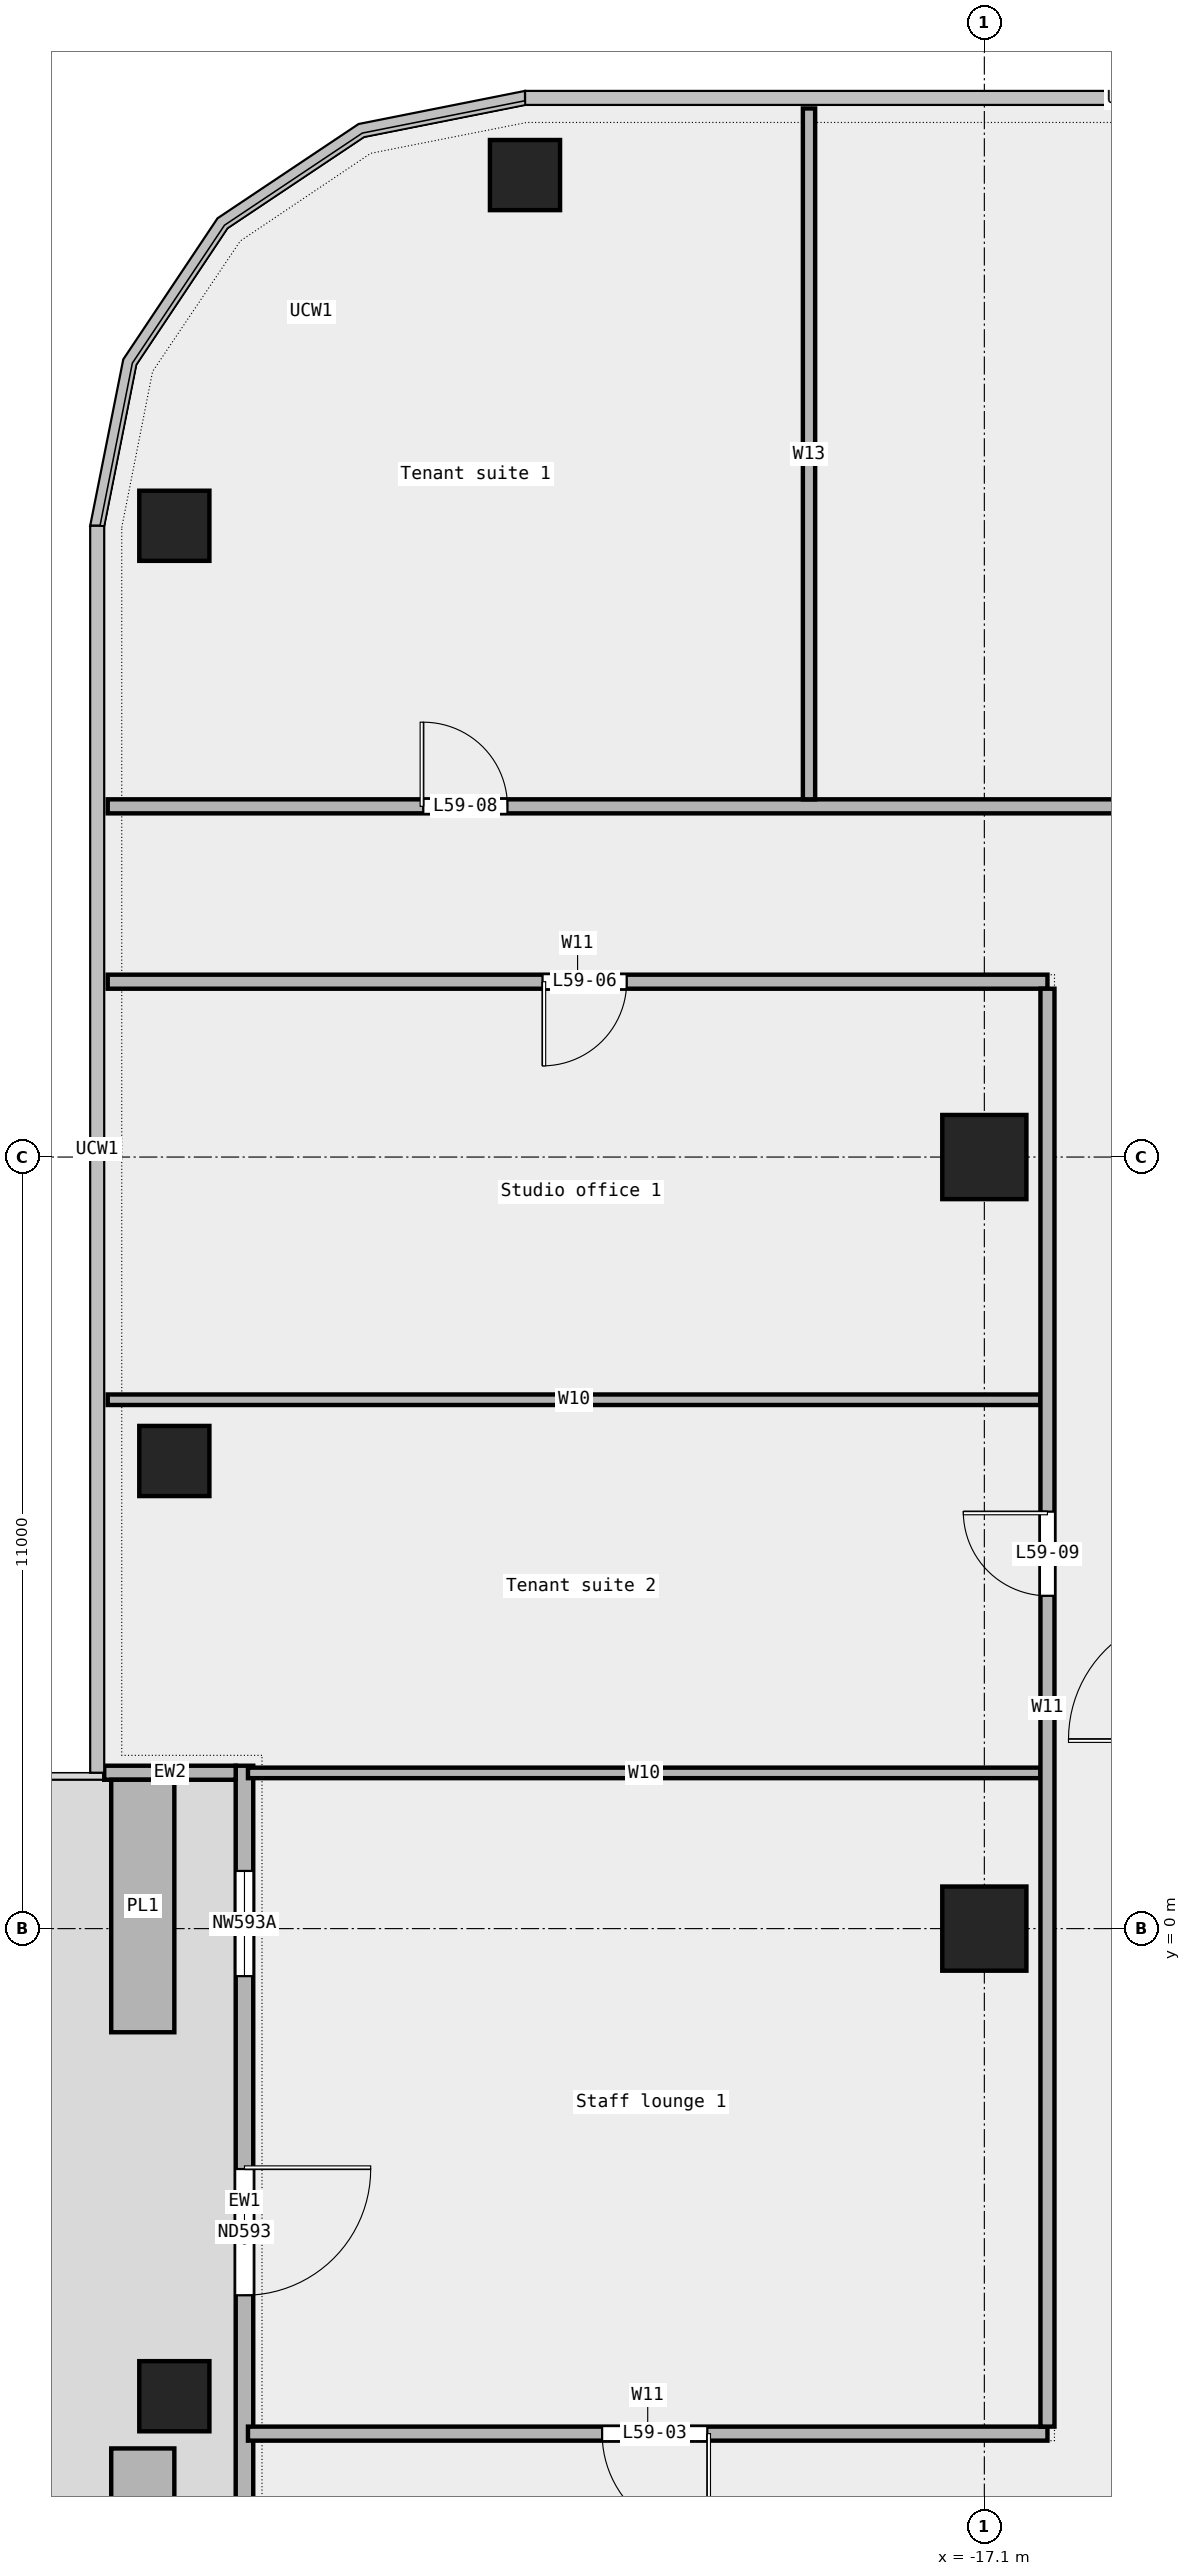
"""IFC4 building model, lengths in metres.
Left out: names, types, materials, properties, quantities, classifications, styles, units other than length and angle.
Written with IfcOpenShell. Run it as: python <this file> out.ifc"""

import sys

from ifc_helpers import new_model, si_unit, direction, frame, frame_2d, origin, origin_2d, place, context, subcontext, project, spatial, rectangle, extrude, element, fill, save


model = new_model("IFC4")
c1 = context("Model", 3, precision=1e-05, world=origin(), true_north=direction((0.0, 1.0)))
c2 = subcontext(c1, "Body", "Model", "MODEL_VIEW")
j1 = project(units=[si_unit("LENGTHUNIT", "METRE"), si_unit("PLANEANGLEUNIT", "RADIAN")], contexts=[c1])
p1 = place(None, origin())
s1 = spatial("IfcSite", under=j1, at=p1, CompositionType="ELEMENT")
p2 = place(p1, origin())
s2 = spatial("IfcBuilding", under=s1, at=p2, CompositionType="ELEMENT")
p3 = place(p2, frame((0.0, 0.0, 275.4)))
s3 = spatial("IfcBuildingStorey", under=s2, at=p3, CompositionType="ELEMENT", Elevation=275.4)
for number, where, z_axis, x_axis in (
    (1, (-23.65, 25.0, 0.0), (0.0, 0.0, 1.0), (1.0, 0.0, 0.0)),
    (2, (-28.65, 20.0, 0.0), (0.0, 0.0, 1.0), (1.0, 0.0, 0.0)),
    (3, (-28.65, 6.667, 0.0), (0.0, 0.0, 1.0), (1.0, 0.0, 0.0)),
    (4, (-28.65, -6.667, 0.0), (0.0, 0.0, 1.0), (1.0, 0.0, 0.0)),
):
    element("IfcColumn", number, at=place(p3, frame(where, z_axis=z_axis, x_axis=x_axis)), inside=s3, PredefinedType="COLUMN", context=c2, shape_type="SweptSolid", body=[
        extrude(rectangle(XDim=1.0, YDim=1.0, at=origin_2d()), origin(), (0.0, 0.0, 1.0), 3.6),
    ])
for number, where, z_axis, x_axis in (
    (5, (-17.1, 0.0, 0.0), (0.0, 0.0, 1.0), (1.0, 0.0, 0.0)),
    (6, (-17.1, 11.0, 0.0), (0.0, 0.0, 1.0), (1.0, 0.0, 0.0)),
):
    element("IfcColumn", number, at=place(p3, frame(where, z_axis=z_axis, x_axis=x_axis)), inside=s3, PredefinedType="COLUMN", context=c2, shape_type="SweptSolid", body=[
        extrude(rectangle(XDim=1.2, YDim=1.2, at=origin_2d()), origin(), (0.0, 0.0, 1.0), 3.6),
    ])
p4 = place(p3, frame((-27.65, 2.322, 0.0), z_axis=(0.0, 0.0, 1.0), x_axis=(0.0, -1.0, 0.0)))
e7 = element("IfcWall", 7, at=p4, inside=s3, PredefinedType="STANDARD", context=c2, shape_type="SweptSolid", body=[
    extrude(rectangle(XDim=13.533, YDim=0.25, at=frame_2d((6.767, 0.0))), origin(), (0.0, 0.0, 1.0), 3.6),
])
p5 = place(p4, frame((1.5, 0.0, 0.45)))
e8 = element("IfcOpeningElement", 8, at=p5, cuts=e7, PredefinedType="OPENING", context=c2, shape_type="SweptSolid", body=[
    extrude(rectangle(XDim=1.5, YDim=2.4, at=frame_2d((0.75, 1.2))), frame((0.0, 0.137, 0.0), z_axis=(0.0, -1.0, 0.0), x_axis=(1.0, 0.0, 0.0)), (0.0, 0.0, 1.0), 0.274),
])
p6 = place(p4, frame((5.75, 0.0, 0.0)))
e9 = element("IfcOpeningElement", 9, at=p6, cuts=e7, PredefinedType="OPENING", context=c2, shape_type="SweptSolid", body=[
    extrude(rectangle(XDim=1.8, YDim=2.4, at=frame_2d((0.9, 1.2))), frame((0.0, 0.137, 0.0), z_axis=(0.0, -1.0, 0.0), x_axis=(1.0, 0.0, 0.0)), (0.0, 0.0, 1.0), 0.274),
])
p7 = place(p4, frame((10.5, 0.0, 0.45)))
e10 = element("IfcOpeningElement", 10, at=p7, cuts=e7, PredefinedType="OPENING", context=c2, shape_type="SweptSolid", body=[
    extrude(rectangle(XDim=1.5, YDim=2.4, at=frame_2d((0.75, 1.2))), frame((0.0, 0.137, 0.0), z_axis=(0.0, -1.0, 0.0), x_axis=(1.0, 0.0, 0.0)), (0.0, 0.0, 1.0), 0.274),
])
p8 = place(p3, frame((-29.65, 2.222, 0.0), z_axis=(0.0, 0.0, 1.0), x_axis=(1.0, 0.0, 0.0)))
e11 = element("IfcWall", 11, at=p8, inside=s3, PredefinedType="STANDARD", context=c2, shape_type="SweptSolid", body=[
    extrude(rectangle(XDim=1.875, YDim=0.2, at=frame_2d((0.938, 0.0))), origin(), (0.0, 0.0, 1.0), 3.6),
])
for number, where, z_axis, x_axis in (
    (12, (-29.1, 2.122, 0.0), (0.0, 0.0, 1.0), (0.0, -1.0, 0.0)),
    (13, (-29.1, -7.411, 0.0), (0.0, 0.0, 1.0), (0.0, -1.0, 0.0)),
):
    element("IfcWall", number, at=place(p3, frame(where, z_axis=z_axis, x_axis=x_axis)), inside=s3, PredefinedType="STANDARD", context=c2, shape_type="SweptSolid", body=[
        extrude(rectangle(XDim=3.6, YDim=0.9, at=frame_2d((1.8, 0.0))), origin(), (0.0, 0.0, 1.0), 0.7),
    ])
p9 = place(p3, frame((-27.6, -7.2, 0.0), z_axis=(0.0, 0.0, 1.0), x_axis=(1.0, 0.0, 0.0)))
e14 = element("IfcWall", 14, at=p9, inside=s3, PredefinedType="PARTITIONING", context=c2, shape_type="SweptSolid", body=[
    extrude(rectangle(XDim=11.4, YDim=0.2, at=frame_2d((5.7, 0.0))), origin(), (0.0, 0.0, 1.0), 3.6),
])
p10 = place(p9, frame((5.05, 0.0, 0.0)))
e15 = element("IfcOpeningElement", 15, at=p10, cuts=e14, PredefinedType="OPENING", context=c2, shape_type="SweptSolid", body=[
    extrude(rectangle(XDim=1.5, YDim=2.1, at=frame_2d((0.75, 1.05))), frame((0.0, 0.112, 0.0), z_axis=(0.0, -1.0, 0.0), x_axis=(1.0, 0.0, 0.0)), (0.0, 0.0, 1.0), 0.224),
])
p11 = place(p3, frame((-27.6, 2.22, 0.0), z_axis=(0.0, 0.0, 1.0), x_axis=(1.0, 0.0, 0.0)))
e16 = element("IfcWall", 16, at=p11, inside=s3, PredefinedType="PARTITIONING", context=c2, shape_type="SweptSolid", body=[
    extrude(rectangle(XDim=11.3, YDim=0.15, at=frame_2d((5.65, 0.0))), origin(), (0.0, 0.0, 1.0), 3.6),
])
p12 = place(p3, frame((-29.6, 7.54, 0.0), z_axis=(0.0, 0.0, 1.0), x_axis=(1.0, 0.0, 0.0)))
e17 = element("IfcWall", 17, at=p12, inside=s3, PredefinedType="PARTITIONING", context=c2, shape_type="SweptSolid", body=[
    extrude(rectangle(XDim=13.3, YDim=0.15, at=frame_2d((6.65, 0.0))), origin(), (0.0, 0.0, 1.0), 3.6),
])
p13 = place(p3, frame((-29.6, 13.5, 0.0), z_axis=(0.0, 0.0, 1.0), x_axis=(1.0, 0.0, 0.0)))
e18 = element("IfcWall", 18, at=p13, inside=s3, PredefinedType="PARTITIONING", context=c2, shape_type="SweptSolid", body=[
    extrude(rectangle(XDim=13.4, YDim=0.2, at=frame_2d((6.7, 0.0))), origin(), (0.0, 0.0, 1.0), 3.6),
])
p14 = place(p13, frame((6.2, 0.0, 0.0)))
e19 = element("IfcOpeningElement", 19, at=p14, cuts=e18, PredefinedType="OPENING", context=c2, shape_type="SweptSolid", body=[
    extrude(rectangle(XDim=1.2, YDim=2.1, at=frame_2d((0.6, 1.05))), frame((0.0, 0.112, 0.0), z_axis=(0.0, -1.0, 0.0), x_axis=(1.0, 0.0, 0.0)), (0.0, 0.0, 1.0), 0.224),
])
p15 = place(p3, frame((-29.6, 16.0, 0.0), z_axis=(0.0, 0.0, 1.0), x_axis=(1.0, 0.0, 0.0)))
e20 = element("IfcWall", 20, at=p15, inside=s3, PredefinedType="PARTITIONING", context=c2, shape_type="SweptSolid", body=[
    extrude(rectangle(XDim=59.2, YDim=0.2, at=frame_2d((29.6, 0.0))), origin(), (0.0, 0.0, 1.0), 3.6),
])
p16 = place(p15, frame((46.625, 0.0, 0.0)))
e21 = element("IfcOpeningElement", 21, at=p16, cuts=e20, PredefinedType="OPENING", context=c2, shape_type="SweptSolid", body=[
    extrude(rectangle(XDim=1.8, YDim=2.1, at=frame_2d((0.9, 1.05))), frame((0.0, 0.112, 0.0), z_axis=(0.0, -1.0, 0.0), x_axis=(1.0, 0.0, 0.0)), (0.0, 0.0, 1.0), 0.224),
])
p17 = place(p15, frame((28.85, 0.0, 0.0)))
e22 = element("IfcOpeningElement", 22, at=p17, cuts=e20, PredefinedType="OPENING", context=c2, shape_type="SweptSolid", body=[
    extrude(rectangle(XDim=1.5, YDim=2.1, at=frame_2d((0.75, 1.05))), frame((0.0, 0.112, 0.0), z_axis=(0.0, -1.0, 0.0), x_axis=(1.0, 0.0, 0.0)), (0.0, 0.0, 1.0), 0.224),
])
p18 = place(p15, frame((4.5, 0.0, 0.0)))
e23 = element("IfcOpeningElement", 23, at=p18, cuts=e20, PredefinedType="OPENING", context=c2, shape_type="SweptSolid", body=[
    extrude(rectangle(XDim=1.2, YDim=2.1, at=frame_2d((0.6, 1.05))), frame((0.0, 0.112, 0.0), z_axis=(0.0, -1.0, 0.0), x_axis=(1.0, 0.0, 0.0)), (0.0, 0.0, 1.0), 0.224),
])
p19 = place(p15, frame((15.825, 0.0, 0.0)))
e24 = element("IfcOpeningElement", 24, at=p19, cuts=e20, PredefinedType="OPENING", context=c2, shape_type="SweptSolid", body=[
    extrude(rectangle(XDim=1.5, YDim=2.1, at=frame_2d((0.75, 1.05))), frame((0.0, 0.112, 0.0), z_axis=(0.0, -1.0, 0.0), x_axis=(1.0, 0.0, 0.0)), (0.0, 0.0, 1.0), 0.224),
])
p20 = place(p3, frame((-19.6, 16.1, 0.0), z_axis=(0.0, 0.0, 1.0), x_axis=(0.0, 1.0, 0.0)))
e25 = element("IfcWall", 25, at=p20, inside=s3, PredefinedType="PARTITIONING", context=c2, shape_type="SweptSolid", body=[
    extrude(rectangle(XDim=9.85, YDim=0.175, at=frame_2d((4.925, 0.0))), origin(), (0.0, 0.0, 1.0), 3.6),
])
p21 = place(p3, frame((-16.2, -7.1, 0.0), z_axis=(0.0, 0.0, 1.0), x_axis=(0.0, 1.0, 0.0)))
e26 = element("IfcWall", 26, at=p21, inside=s3, PredefinedType="PARTITIONING", context=c2, shape_type="SweptSolid", body=[
    extrude(rectangle(XDim=20.5, YDim=0.2, at=frame_2d((10.25, 0.0))), origin(), (0.0, 0.0, 1.0), 3.6),
])
p22 = place(p21, frame((11.845, 0.0, 0.0)))
e27 = element("IfcOpeningElement", 27, at=p22, cuts=e26, PredefinedType="OPENING", context=c2, shape_type="SweptSolid", body=[
    extrude(rectangle(XDim=1.2, YDim=2.1, at=frame_2d((0.6, 1.05))), frame((0.0, 0.112, 0.0), z_axis=(0.0, -1.0, 0.0), x_axis=(1.0, 0.0, 0.0)), (0.0, 0.0, 1.0), 0.224),
])
p23 = place(p5, origin())
e28 = element("IfcWindow", 28, at=p23, inside=s3, PartitioningType="SINGLE_PANEL", PredefinedType="WINDOW", context=c2, shape_type="SweptSolid", body=[
    extrude(rectangle(XDim=1.5, YDim=2.4, at=frame_2d((0.75, 1.2))), frame((0.0, 0.03, 0.0), z_axis=(0.0, -1.0, 0.0), x_axis=(1.0, 0.0, 0.0)), (0.0, 0.0, 1.0), 0.06),
])
fill(e8, e28)
p24 = place(p6, origin())
e29 = element("IfcDoor", 29, at=p24, inside=s3, OperationType="DOUBLE_DOOR_SINGLE_SWING", PredefinedType="DOOR", context=c2, shape_type="SweptSolid", body=[
    extrude(rectangle(XDim=1.8, YDim=2.4, at=frame_2d((0.9, 1.2))), frame((0.0, 0.025, 0.0), z_axis=(0.0, -1.0, 0.0), x_axis=(1.0, 0.0, 0.0)), (0.0, 0.0, 1.0), 0.05),
])
fill(e9, e29)
p25 = place(p10, origin())
e30 = element("IfcDoor", 30, at=p25, inside=s3, OperationType="DOUBLE_DOOR_SINGLE_SWING", PredefinedType="DOOR", context=c2, shape_type="SweptSolid", body=[
    extrude(rectangle(XDim=1.5, YDim=2.1, at=frame_2d((0.75, 1.05))), frame((0.0, 0.025, 0.0), z_axis=(0.0, -1.0, 0.0), x_axis=(1.0, 0.0, 0.0)), (0.0, 0.0, 1.0), 0.05),
])
fill(e15, e30)
p26 = place(p14, origin())
e31 = element("IfcDoor", 31, at=p26, inside=s3, OperationType="SINGLE_SWING_RIGHT", PredefinedType="DOOR", context=c2, shape_type="SweptSolid", body=[
    extrude(rectangle(XDim=1.2, YDim=2.1, at=frame_2d((0.6, 1.05))), frame((0.0, 0.025, 0.0), z_axis=(0.0, -1.0, 0.0), x_axis=(1.0, 0.0, 0.0)), (0.0, 0.0, 1.0), 0.05),
])
fill(e19, e31)
p27 = place(p18, origin())
e32 = element("IfcDoor", 32, at=p27, inside=s3, OperationType="SINGLE_SWING_LEFT", PredefinedType="DOOR", context=c2, shape_type="SweptSolid", body=[
    extrude(rectangle(XDim=1.2, YDim=2.1, at=frame_2d((0.6, 1.05))), frame((0.0, 0.025, 0.0), z_axis=(0.0, -1.0, 0.0), x_axis=(1.0, 0.0, 0.0)), (0.0, 0.0, 1.0), 0.05),
])
fill(e23, e32)
p28 = place(p22, origin())
e33 = element("IfcDoor", 33, at=p28, inside=s3, OperationType="SINGLE_SWING_RIGHT", PredefinedType="DOOR", context=c2, shape_type="SweptSolid", body=[
    extrude(rectangle(XDim=1.2, YDim=2.1, at=frame_2d((0.6, 1.05))), frame((0.0, 0.025, 0.0), z_axis=(0.0, -1.0, 0.0), x_axis=(1.0, 0.0, 0.0)), (0.0, 0.0, 1.0), 0.05),
])
fill(e27, e33)
save(model, sys.argv[1])
